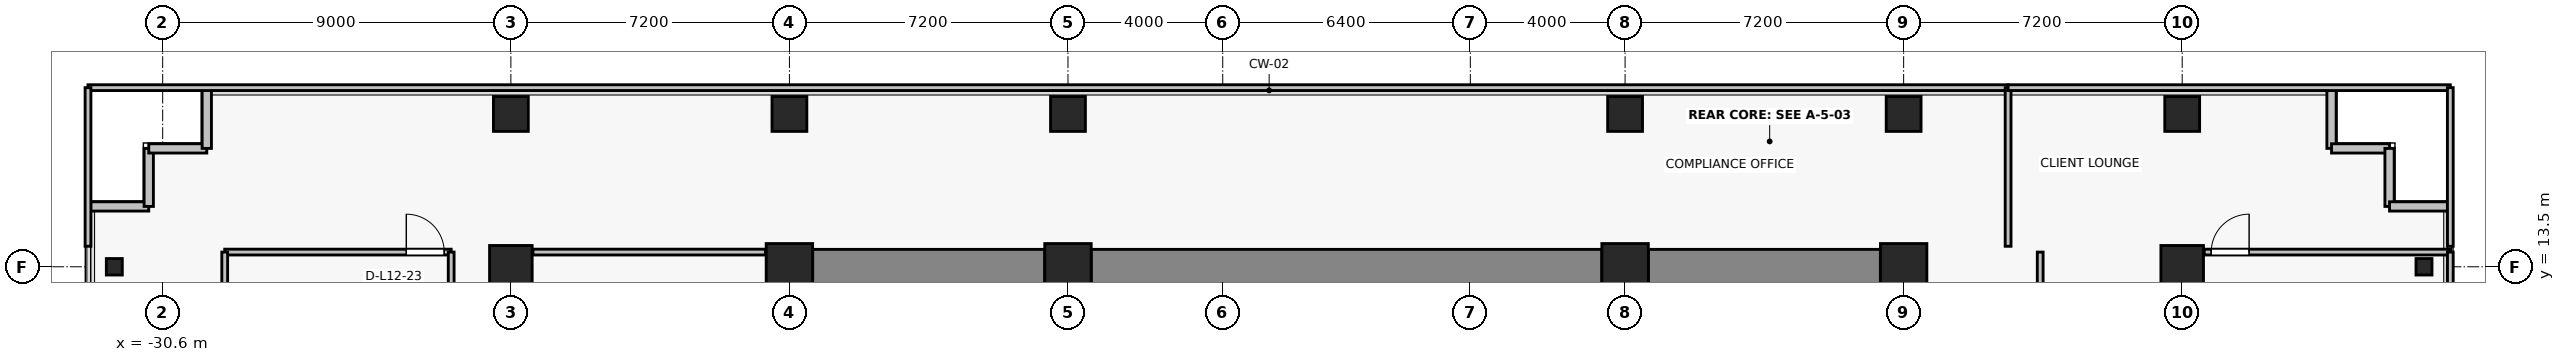
"""IFC4 building model, lengths in metres.
Left out: names, types, materials, properties, quantities, classifications, styles, units other than length and angle.
Written with IfcOpenShell. Run it as: python <this file> out.ifc"""

import sys

from ifc_helpers import new_model, si_unit, direction, frame, frame_2d, origin, origin_2d, place, context, subcontext, project, spatial, rectangle, i_section, extrude, source, transform, mapped, element, fill, save


model = new_model("IFC4")
c1 = context("Model", 3, precision=1e-05, world=origin(), true_north=direction((0.0, 1.0)))
c2 = subcontext(c1, "Body", "Model", "MODEL_VIEW")
j1 = project(units=[si_unit("LENGTHUNIT", "METRE"), si_unit("PLANEANGLEUNIT", "RADIAN")], contexts=[c1])
p1 = place(None, origin())
s1 = spatial("IfcSite", under=j1, at=p1, CompositionType="ELEMENT")
p2 = place(p1, origin())
s2 = spatial("IfcBuilding", under=s1, at=p2, CompositionType="ELEMENT")
p3 = place(p2, frame((0.0, 0.0, 47.2)))
s3 = spatial("IfcBuildingStorey", under=s2, at=p3, CompositionType="ELEMENT", Elevation=47.2)
for number, where, z_axis, x_axis in (
    (1, (-14.4, 13.5, 0.0), (0.0, 0.0, 1.0), (1.0, 0.0, 0.0)),
    (2, (-7.2, 13.5, 0.0), (0.0, 0.0, 1.0), (1.0, 0.0, 0.0)),
    (3, (7.2, 13.5, 0.0), (0.0, 0.0, 1.0), (1.0, 0.0, 0.0)),
    (4, (14.4, 13.5, 0.0), (0.0, 0.0, 1.0), (1.0, 0.0, 0.0)),
):
    element("IfcColumn", number, at=place(p3, frame(where, z_axis=z_axis, x_axis=x_axis)), inside=s3, PredefinedType="COLUMN", context=c2, shape_type="SweptSolid", body=[
        extrude(rectangle(XDim=1.2, YDim=1.2, at=origin_2d()), origin(), (0.0, 0.0, 1.0), 3.3),
    ])
for number, where, z_axis, x_axis in (
    (5, (-21.6, 13.5, 0.0), (0.0, 0.0, 1.0), (1.0, 0.0, 0.0)),
    (6, (21.6, 13.5, 0.0), (0.0, 0.0, 1.0), (1.0, 0.0, 0.0)),
):
    element("IfcColumn", number, at=place(p3, frame(where, z_axis=z_axis, x_axis=x_axis)), inside=s3, PredefinedType="COLUMN", context=c2, shape_type="SweptSolid", body=[
        extrude(rectangle(XDim=1.1, YDim=1.1, at=origin_2d()), origin(), (0.0, 0.0, 1.0), 3.3),
    ])
for number, where, z_axis, x_axis in (
    (7, (-14.4, 17.45, 0.0), (0.0, 0.0, 1.0), (1.0, 0.0, 0.0)),
    (8, (-7.2, 17.45, 0.0), (0.0, 0.0, 1.0), (1.0, 0.0, 0.0)),
    (9, (7.2, 17.45, 0.0), (0.0, 0.0, 1.0), (1.0, 0.0, 0.0)),
    (10, (14.4, 17.45, 0.0), (0.0, 0.0, 1.0), (1.0, 0.0, 0.0)),
    (11, (-21.6, 17.45, 0.0), (0.0, 0.0, 1.0), (1.0, 0.0, 0.0)),
    (12, (21.6, 17.45, 0.0), (0.0, 0.0, 1.0), (1.0, 0.0, 0.0)),
):
    element("IfcColumn", number, at=place(p3, frame(where, z_axis=z_axis, x_axis=x_axis)), inside=s3, PredefinedType="COLUMN", context=c2, shape_type="SweptSolid", body=[
        extrude(rectangle(XDim=0.9, YDim=0.9, at=origin_2d()), origin(), (0.0, 0.0, 1.0), 3.3),
    ])
for number, where, z_axis, x_axis in (
    (13, (-31.85, 13.5, 0.0), (0.0, 0.0, 1.0), (1.0, 0.0, 0.0)),
    (14, (27.85, 13.5, 0.0), (0.0, 0.0, 1.0), (1.0, 0.0, 0.0)),
):
    element("IfcColumn", number, at=place(p3, frame(where, z_axis=z_axis, x_axis=x_axis)), inside=s3, PredefinedType="COLUMN", context=c2, shape_type="SweptSolid", body=[
        extrude(i_section(OverallWidth=0.412, OverallDepth=0.425, WebThickness=0.026, FlangeThickness=0.039, FilletRadius=0.015, at=origin_2d()), origin(), (0.0, 0.0, 1.0), 3.3),
    ])
p4 = place(p3, frame((-13.8, 13.5, 0.0), z_axis=(0.0, 0.0, 1.0), x_axis=(1.0, 0.0, 0.0)))
e15 = element("IfcWall", 15, at=p4, inside=s3, PredefinedType="SHEAR", context=c2, shape_type="SweptSolid", body=[
    extrude(rectangle(XDim=6.0, YDim=0.9, at=frame_2d((3.0, 0.0))), origin(), (0.0, 0.0, 1.0), 3.075),
])
p5 = place(p3, frame((-6.6, 13.5, 0.0), z_axis=(0.0, 0.0, 1.0), x_axis=(1.0, 0.0, 0.0)))
e16 = element("IfcWall", 16, at=p5, inside=s3, PredefinedType="SHEAR", context=c2, shape_type="SweptSolid", body=[
    extrude(rectangle(XDim=13.2, YDim=0.9, at=frame_2d((6.6, 0.0))), origin(), (0.0, 0.0, 1.0), 3.075),
])
p6 = place(p3, frame((7.8, 13.5, 0.0), z_axis=(0.0, 0.0, 1.0), x_axis=(1.0, 0.0, 0.0)))
e17 = element("IfcWall", 17, at=p6, inside=s3, PredefinedType="SHEAR", context=c2, shape_type="SweptSolid", body=[
    extrude(rectangle(XDim=6.0, YDim=0.9, at=frame_2d((3.0, 0.0))), origin(), (0.0, 0.0, 1.0), 3.075),
])
for number, where, z_axis, x_axis in (
    (18, (-30.96, 15.06, 0.0), (0.0, 0.0, 1.0), (-1.0, 0.0, 0.0)),
    (19, (-30.96, 16.56, 0.0), (0.0, 0.0, 1.0), (0.0, -1.0, 0.0)),
    (20, (-29.46, 16.56, 0.0), (0.0, 0.0, 1.0), (-1.0, 0.0, 0.0)),
    (21, (-29.46, 18.06, 0.0), (0.0, 0.0, 1.0), (0.0, -1.0, 0.0)),
    (22, (25.46, 16.56, 0.0), (0.0, 0.0, 1.0), (0.0, 1.0, 0.0)),
    (23, (26.96, 16.56, 0.0), (0.0, 0.0, 1.0), (-1.0, 0.0, 0.0)),
    (24, (26.96, 15.06, 0.0), (0.0, 0.0, 1.0), (0.0, 1.0, 0.0)),
    (25, (28.46, 15.06, 0.0), (0.0, 0.0, 1.0), (-1.0, 0.0, 0.0)),
):
    element("IfcWall", number, at=place(p3, frame(where, z_axis=z_axis, x_axis=x_axis)), inside=s3, PredefinedType="SOLIDWALL", context=c2, shape_type="SweptSolid", body=[
        extrude(rectangle(XDim=1.5, YDim=0.24, at=frame_2d((0.75, 0.0))), origin(), (0.0, 0.0, 1.0), 3.075),
    ])
p7 = place(p3, frame((-28.996, 13.88, 0.0), z_axis=(0.0, 0.0, 1.0), x_axis=(1.0, 0.0, 0.0)))
e26 = element("IfcWall", 26, at=p7, inside=s3, PredefinedType="PARTITIONING", context=c2, shape_type="SweptSolid", body=[
    extrude(rectangle(XDim=5.853, YDim=0.15, at=frame_2d((2.927, 0.0))), origin(), (0.0, 0.0, 1.0), 3.075),
])
p8 = place(p7, frame((4.693, 0.0, 0.0)))
e27 = element("IfcOpeningElement", 27, at=p8, cuts=e26, PredefinedType="OPENING", context=c2, shape_type="SweptSolid", body=[
    extrude(rectangle(XDim=0.98, YDim=2.15, at=frame_2d((0.49, 1.075))), frame((0.0, 0.085, 0.0), z_axis=(0.0, -1.0, 0.0), x_axis=(1.0, 0.0, 0.0)), (0.0, 0.0, 1.0), 0.17),
])
for number, where, z_axis, x_axis in (
    (28, (-28.996, -1.77, 0.0), (0.0, 0.0, 1.0), (0.0, 1.0, 0.0)),
    (29, (-23.143, 13.88, 0.0), (0.0, 0.0, 1.0), (0.0, -1.0, 0.0)),
):
    element("IfcWall", number, at=place(p3, frame(where, z_axis=z_axis, x_axis=x_axis)), inside=s3, PredefinedType="PARTITIONING", context=c2, shape_type="SweptSolid", body=[
        extrude(rectangle(XDim=15.65, YDim=0.15, at=frame_2d((7.825, 0.0))), origin(), (0.0, 0.0, 1.0), 2.465),
    ])
p9 = place(p3, frame((-21.03, 13.88, 0.0), z_axis=(0.0, 0.0, 1.0), x_axis=(1.0, 0.0, 0.0)))
e30 = element("IfcWall", 30, at=p9, inside=s3, PredefinedType="PARTITIONING", context=c2, shape_type="SweptSolid", body=[
    extrude(rectangle(XDim=6.01, YDim=0.15, at=frame_2d((3.005, 0.0))), origin(), (0.0, 0.0, 1.0), 3.075),
])
p10 = place(p3, frame((22.17, 13.88, 0.0), z_axis=(0.0, 0.0, 1.0), x_axis=(1.0, 0.0, 0.0)))
e31 = element("IfcWall", 31, at=p10, inside=s3, PredefinedType="PARTITIONING", context=c2, shape_type="SweptSolid", body=[
    extrude(rectangle(XDim=6.36, YDim=0.15, at=frame_2d((3.18, 0.0))), origin(), (0.0, 0.0, 1.0), 3.075),
])
p11 = place(p10, frame((0.18, 0.0, 0.0)))
e32 = element("IfcOpeningElement", 32, at=p11, cuts=e31, PredefinedType="OPENING", context=c2, shape_type="SweptSolid", body=[
    extrude(rectangle(XDim=0.98, YDim=2.15, at=frame_2d((0.49, 1.075))), frame((0.0, 0.085, 0.0), z_axis=(0.0, -1.0, 0.0), x_axis=(1.0, 0.0, 0.0)), (0.0, 0.0, 1.0), 0.17),
])
p12 = place(p3, frame((17.93, 8.075, 0.0), z_axis=(0.0, 0.0, 1.0), x_axis=(0.0, 1.0, 0.0)))
e33 = element("IfcWall", 33, at=p12, inside=s3, PredefinedType="PARTITIONING", context=c2, shape_type="SweptSolid", body=[
    extrude(rectangle(XDim=5.805, YDim=0.15, at=frame_2d((2.902, 0.0))), origin(), (0.0, 0.0, 1.0), 2.465),
])
p13 = place(p12, frame((2.413, 0.0, 0.0)))
e34 = element("IfcOpeningElement", 34, at=p13, cuts=e33, PredefinedType="OPENING", context=c2, shape_type="SweptSolid", body=[
    extrude(rectangle(XDim=0.98, YDim=2.15, at=frame_2d((0.49, 1.075))), frame((0.0, 0.085, 0.0), z_axis=(0.0, -1.0, 0.0), x_axis=(1.0, 0.0, 0.0)), (0.0, 0.0, 1.0), 0.17),
])
p14 = place(p3, frame((28.53, 13.88, 0.0), z_axis=(0.0, 0.0, 1.0), x_axis=(0.0, -1.0, 0.0)))
e35 = element("IfcWall", 35, at=p14, inside=s3, PredefinedType="PARTITIONING", context=c2, shape_type="SweptSolid", body=[
    extrude(rectangle(XDim=5.805, YDim=0.15, at=frame_2d((2.902, 0.0))), origin(), (0.0, 0.0, 1.0), 3.075),
])
p15 = place(p3, frame((-32.53, 18.13, 0.0), z_axis=(0.0, 0.0, 1.0), x_axis=(1.0, 0.0, 0.0)))
e36 = element("IfcWall", 36, at=p15, inside=s3, PredefinedType="PARTITIONING", context=c2, shape_type="SweptSolid", body=[
    extrude(rectangle(XDim=49.63, YDim=0.15, at=frame_2d((24.815, 0.0))), origin(), (0.0, 0.0, 1.0), 3.075),
])
p16 = place(p3, frame((-32.53, 14.03, 0.0), z_axis=(0.0, 0.0, 1.0), x_axis=(0.0, 1.0, 0.0)))
e37 = element("IfcWall", 37, at=p16, inside=s3, PredefinedType="PARTITIONING", context=c2, shape_type="SweptSolid", body=[
    extrude(rectangle(XDim=4.1, YDim=0.15, at=frame_2d((2.05, 0.0))), origin(), (0.0, 0.0, 1.0), 3.075),
])
p17 = place(p3, frame((17.1, 18.13, 0.0), z_axis=(0.0, 0.0, 1.0), x_axis=(0.0, -1.0, 0.0)))
e38 = element("IfcWall", 38, at=p17, inside=s3, PredefinedType="PARTITIONING", context=c2, shape_type="SweptSolid", body=[
    extrude(rectangle(XDim=4.1, YDim=0.15, at=frame_2d((2.05, 0.0))), origin(), (0.0, 0.0, 1.0), 2.465),
])
p18 = place(p3, frame((17.1, 18.13, 0.0), z_axis=(0.0, 0.0, 1.0), x_axis=(1.0, 0.0, 0.0)))
e39 = element("IfcWall", 39, at=p18, inside=s3, PredefinedType="PARTITIONING", context=c2, shape_type="SweptSolid", body=[
    extrude(rectangle(XDim=11.43, YDim=0.15, at=frame_2d((5.715, 0.0))), origin(), (0.0, 0.0, 1.0), 3.075),
])
p19 = place(p3, frame((28.53, 18.13, 0.0), z_axis=(0.0, 0.0, 1.0), x_axis=(0.0, -1.0, 0.0)))
e40 = element("IfcWall", 40, at=p19, inside=s3, PredefinedType="PARTITIONING", context=c2, shape_type="SweptSolid", body=[
    extrude(rectangle(XDim=4.1, YDim=0.15, at=frame_2d((2.05, 0.0))), origin(), (0.0, 0.0, 1.0), 3.075),
])
m1 = source(origin(), c2, "Body", "SweptSolid", [
    extrude(rectangle(XDim=0.98, YDim=2.15, at=frame_2d((0.49, 1.075))), frame((0.0, 0.025, 0.0), z_axis=(0.0, -1.0, 0.0), x_axis=(1.0, 0.0, 0.0)), (0.0, 0.0, 1.0), 0.05),
])
p20 = place(p8, origin())
e41 = element("IfcDoor", 41, at=p20, inside=s3, OperationType="SINGLE_SWING_LEFT", PredefinedType="DOOR", context=c2, shape_type="MappedRepresentation", body=[
    mapped(m1, transform((0.0, 0.0, 0.0), x_axis=(1.0, 0.0, 0.0), y_axis=(0.0, 1.0, 0.0), z_axis=(0.0, 0.0, 1.0), scale=1.0)),
])
fill(e27, e41)
p21 = place(p11, origin())
e42 = element("IfcDoor", 42, at=p21, inside=s3, OperationType="SINGLE_SWING_RIGHT", PredefinedType="DOOR", context=c2, shape_type="MappedRepresentation", body=[
    mapped(m1, transform((0.0, 0.0, 0.0), x_axis=(1.0, 0.0, 0.0), y_axis=(0.0, 1.0, 0.0), z_axis=(0.0, 0.0, 1.0), scale=1.0)),
])
fill(e32, e42)
save(model, sys.argv[1])
